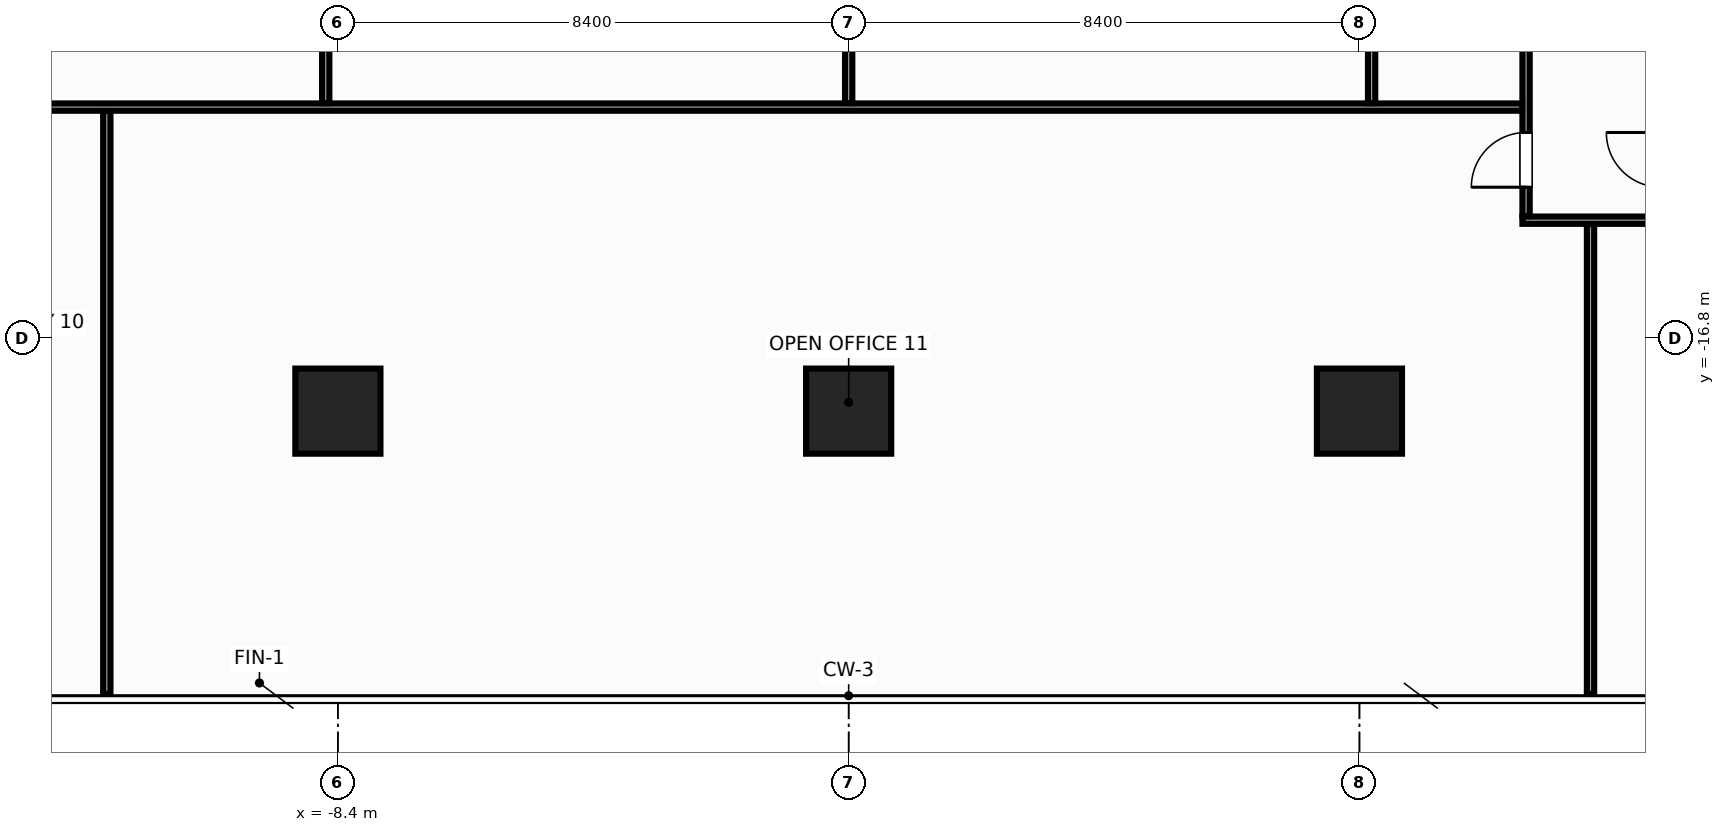
"""IFC4 building model, lengths in metres.
Left out: names, types, materials, properties, quantities, classifications, styles, units other than length and angle.
Written with IfcOpenShell. Run it as: python <this file> out.ifc"""

import sys

from ifc_helpers import new_model, si_unit, direction, frame, frame_2d, origin, origin_2d, place, context, subcontext, project, spatial, rectangle, extrude, source, transform, mapped, element, fill, save


model = new_model("IFC4")
c1 = context("Model", 3, precision=1e-05, world=origin(), true_north=direction((0.0, 1.0)))
c2 = subcontext(c1, "Body", "Model", "MODEL_VIEW")
j1 = project(units=[si_unit("LENGTHUNIT", "METRE"), si_unit("PLANEANGLEUNIT", "RADIAN")], contexts=[c1])
p1 = place(None, origin())
s1 = spatial("IfcSite", under=j1, at=p1, CompositionType="ELEMENT")
p2 = place(p1, origin())
s2 = spatial("IfcBuilding", under=s1, at=p2, CompositionType="ELEMENT")
p3 = place(p2, frame((0.0, 0.0, 182.0)))
s3 = spatial("IfcBuildingStorey", under=s2, at=p3, CompositionType="ELEMENT", Elevation=182.0)
m1 = source(origin(), c2, "Body", "SweptSolid", [
    extrude(rectangle(XDim=1.4, YDim=1.4, at=origin_2d()), origin(), (0.0, 0.0, 1.0), 3.6),
])
for number, where, z_axis, x_axis in (
    (1, (-8.4, -18.0, 0.0), (0.0, 0.0, 1.0), (1.0, 0.0, 0.0)),
    (2, (8.4, -18.0, 0.0), (0.0, 0.0, 1.0), (1.0, 0.0, 0.0)),
    (3, (0.0, -18.0, 0.0), (0.0, 0.0, 1.0), (1.0, 0.0, 0.0)),
):
    element("IfcColumn", number, at=place(p3, frame(where, z_axis=z_axis, x_axis=x_axis)), inside=s3, PredefinedType="COLUMN", context=c2, shape_type="MappedRepresentation", body=[
        mapped(m1, transform((0.0, 0.0, 0.0), x_axis=(1.0, 0.0, 0.0), y_axis=(0.0, 1.0, 0.0), z_axis=(0.0, 0.0, 1.0), scale=1.0)),
    ])
m2 = source(origin(), c2, "Body", "SweptSolid", [
    extrude(rectangle(XDim=2.34, YDim=0.12, at=frame_2d((1.17, 0.0))), origin(), (0.0, 0.0, 1.0), 3.38),
])
p4 = place(p3, frame((11.08, -14.86, 0.0), z_axis=(0.0, 0.0, 1.0), x_axis=(1.0, 0.0, 0.0)))
e4 = element("IfcWall", 4, at=p4, inside=s3, PredefinedType="PARTITIONING", context=c2, shape_type="MappedRepresentation", body=[
    mapped(m2, transform((0.0, 0.0, 0.0), x_axis=(1.0, 0.0, 0.0), y_axis=(0.0, 1.0, 0.0), z_axis=(0.0, 0.0, 1.0), scale=1.0)),
])
m3 = source(origin(), c2, "Body", "SweptSolid", [
    extrude(rectangle(XDim=22.595, YDim=0.12, at=frame_2d((11.297, 0.0))), origin(), (0.0, 0.0, 1.0), 2.665),
])
p5 = place(p3, frame((11.14, -14.795, 0.0), z_axis=(0.0, 0.0, 1.0), x_axis=(0.0, 1.0, 0.0)))
e5 = element("IfcWall", 5, at=p5, inside=s3, PredefinedType="PARTITIONING", context=c2, shape_type="MappedRepresentation", body=[
    mapped(m3, transform((0.0, 0.0, 0.0), x_axis=(1.0, 0.0, 0.0), y_axis=(0.0, 1.0, 0.0), z_axis=(0.0, 0.0, 1.0), scale=1.0)),
])
p6 = place(p5, frame((0.478, 0.0, 0.0)))
e6 = element("IfcOpeningElement", 6, at=p6, cuts=e5, PredefinedType="OPENING", context=c2, shape_type="SweptSolid", body=[
    extrude(rectangle(XDim=0.9, YDim=2.15, at=frame_2d((0.45, 1.075))), frame((0.0, 0.072, 0.0), z_axis=(0.0, -1.0, 0.0), x_axis=(1.0, 0.0, 0.0)), (0.0, 0.0, 1.0), 0.144),
])
m4 = source(origin(), c2, "Body", "SweptSolid", [
    extrude(rectangle(XDim=34.925, YDim=0.12, at=frame_2d((17.462, 0.0))), origin(), (0.0, 0.0, 1.0), 2.965),
])
p7 = place(p3, frame((-23.85, -13.0, 0.0), z_axis=(0.0, 0.0, 1.0), x_axis=(1.0, 0.0, 0.0)))
e7 = element("IfcWall", 7, at=p7, inside=s3, PredefinedType="PARTITIONING", context=c2, shape_type="MappedRepresentation", body=[
    mapped(m4, transform((0.0, 0.0, 0.0), x_axis=(1.0, 0.0, 0.0), y_axis=(0.0, 1.0, 0.0), z_axis=(0.0, 0.0, 1.0), scale=1.0)),
])
p8 = place(p7, frame((1.515, 0.0, 0.0)))
e8 = element("IfcOpeningElement", 8, at=p8, cuts=e7, PredefinedType="OPENING", context=c2, shape_type="SweptSolid", body=[
    extrude(rectangle(XDim=1.4, YDim=2.2, at=frame_2d((0.7, 1.1))), frame((0.0, 0.072, 0.0), z_axis=(0.0, -1.0, 0.0), x_axis=(1.0, 0.0, 0.0)), (0.0, 0.0, 1.0), 0.144),
])
p9 = place(p7, frame((8.15, 0.0, 0.0)))
e9 = element("IfcOpeningElement", 9, at=p9, cuts=e7, PredefinedType="OPENING", context=c2, shape_type="SweptSolid", body=[
    extrude(rectangle(XDim=1.4, YDim=2.2, at=frame_2d((0.7, 1.1))), frame((0.0, 0.072, 0.0), z_axis=(0.0, -1.0, 0.0), x_axis=(1.0, 0.0, 0.0)), (0.0, 0.0, 1.0), 0.144),
])
m5 = source(origin(), c2, "Body", "SweptSolid", [
    extrude(rectangle(XDim=1.625, YDim=0.12, at=frame_2d((0.812, 0.0))), origin(), (0.0, 0.0, 1.0), 2.965),
])
for number, where, z_axis, x_axis in (
    (10, (-8.6, -12.935, 0.0), (0.0, 0.0, 1.0), (0.0, 1.0, 0.0)),
    (11, (0.0, -12.935, 0.0), (0.0, 0.0, 1.0), (0.0, 1.0, 0.0)),
    (12, (8.6, -12.935, 0.0), (0.0, 0.0, 1.0), (0.0, 1.0, 0.0)),
):
    element("IfcWall", number, at=place(p3, frame(where, z_axis=z_axis, x_axis=x_axis)), inside=s3, PredefinedType="PARTITIONING", context=c2, shape_type="MappedRepresentation", body=[
        mapped(m5, transform((0.0, 0.0, 0.0), x_axis=(1.0, 0.0, 0.0), y_axis=(0.0, 1.0, 0.0), z_axis=(0.0, 0.0, 1.0), scale=1.0)),
    ])
m6 = source(origin(), c2, "Body", "SweptSolid", [
    extrude(rectangle(XDim=9.585, YDim=0.12, at=frame_2d((4.792, 0.0))), origin(), (0.0, 0.0, 1.0), 2.915),
])
p10 = place(p3, frame((-12.2, -22.65, 0.0), z_axis=(0.0, 0.0, 1.0), x_axis=(0.0, 1.0, 0.0)))
e13 = element("IfcWall", 13, at=p10, inside=s3, PredefinedType="PARTITIONING", context=c2, shape_type="MappedRepresentation", body=[
    mapped(m6, transform((0.0, 0.0, 0.0), x_axis=(1.0, 0.0, 0.0), y_axis=(0.0, 1.0, 0.0), z_axis=(0.0, 0.0, 1.0), scale=1.0)),
])
m7 = source(origin(), c2, "Body", "SweptSolid", [
    extrude(rectangle(XDim=7.725, YDim=0.12, at=frame_2d((3.862, 0.0))), origin(), (0.0, 0.0, 1.0), 2.915),
])
p11 = place(p3, frame((12.2, -22.65, 0.0), z_axis=(0.0, 0.0, 1.0), x_axis=(0.0, 1.0, 0.0)))
e14 = element("IfcWall", 14, at=p11, inside=s3, PredefinedType="PARTITIONING", context=c2, shape_type="MappedRepresentation", body=[
    mapped(m7, transform((0.0, 0.0, 0.0), x_axis=(1.0, 0.0, 0.0), y_axis=(0.0, 1.0, 0.0), z_axis=(0.0, 0.0, 1.0), scale=1.0)),
])
m8 = source(origin(), c2, "Body", "SweptSolid", [
    extrude(rectangle(XDim=0.9, YDim=2.15, at=frame_2d((0.45, 1.075))), frame((0.0, 0.025, 0.0), z_axis=(0.0, -1.0, 0.0), x_axis=(1.0, 0.0, 0.0)), (0.0, 0.0, 1.0), 0.05),
])
p12 = place(p6, origin())
e15 = element("IfcDoor", 15, at=p12, inside=s3, OperationType="SINGLE_SWING_LEFT", PredefinedType="DOOR", context=c2, shape_type="MappedRepresentation", body=[
    mapped(m8, transform((0.0, 0.0, 0.0), x_axis=(1.0, 0.0, 0.0), y_axis=(0.0, 1.0, 0.0), z_axis=(0.0, 0.0, 1.0), scale=1.0)),
])
fill(e6, e15)
save(model, sys.argv[1])
